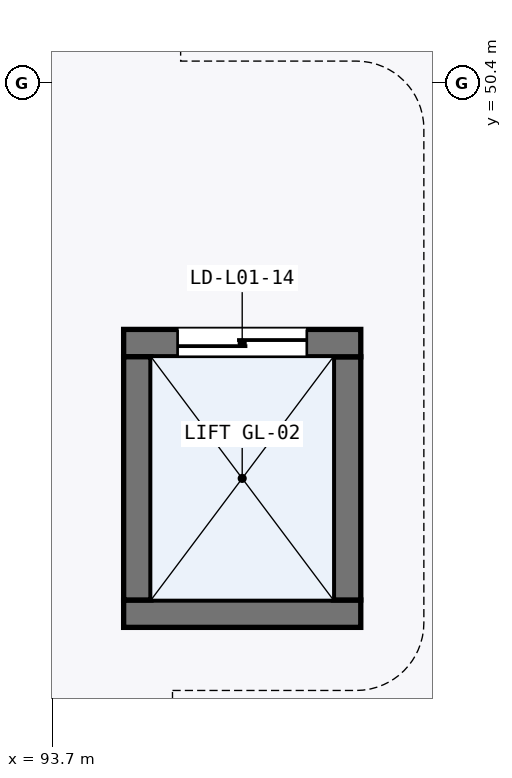
"""IFC4 building model, lengths in metres.
Left out: names, types, materials, properties, quantities, classifications, styles, units other than length and angle.
Written with IfcOpenShell. Run it as: python <this file> out.ifc"""

import sys

from ifc_helpers import new_model, si_unit, direction, frame, frame_2d, origin, place, context, subcontext, project, spatial, rectangle, extrude, element, fill, save


model = new_model("IFC4")
c1 = context("Model", 3, precision=1e-05, world=origin(), true_north=direction((0.0, 1.0)))
c2 = subcontext(c1, "Body", "Model", "MODEL_VIEW")
j1 = project(units=[si_unit("LENGTHUNIT", "METRE"), si_unit("PLANEANGLEUNIT", "RADIAN")], contexts=[c1])
p1 = place(None, origin())
s1 = spatial("IfcSite", under=j1, at=p1, CompositionType="ELEMENT")
p2 = place(p1, origin())
s2 = spatial("IfcBuilding", under=s1, at=p2, CompositionType="ELEMENT")
p3 = place(p2, origin())
s3 = spatial("IfcBuildingStorey", under=s2, at=p3, CompositionType="ELEMENT", Elevation=0.0)
p4 = place(p3, frame((94.64, 43.42, 0.0), z_axis=(0.0, 0.0, 1.0), x_axis=(1.0, 0.0, 0.0)))
e1 = element("IfcWall", 1, at=p4, inside=s3, PredefinedType="SHEAR", context=c2, shape_type="SweptSolid", body=[
    extrude(rectangle(XDim=3.12, YDim=0.36, at=frame_2d((1.56, 0.0))), origin(), (0.0, 0.0, 1.0), 5.745),
])
p5 = place(p3, frame((97.58, 43.6, 0.0), z_axis=(0.0, 0.0, 1.0), x_axis=(0.0, 1.0, 0.0)))
e2 = element("IfcWall", 2, at=p5, inside=s3, PredefinedType="SHEAR", context=c2, shape_type="SweptSolid", body=[
    extrude(rectangle(XDim=3.2, YDim=0.36, at=frame_2d((1.6, 0.0))), origin(), (0.0, 0.0, 1.0), 5.745),
])
p6 = place(p3, frame((97.76, 46.98, 0.0), z_axis=(0.0, 0.0, 1.0), x_axis=(-1.0, 0.0, 0.0)))
e3 = element("IfcWall", 3, at=p6, inside=s3, PredefinedType="SHEAR", context=c2, shape_type="SweptSolid", body=[
    extrude(rectangle(XDim=3.12, YDim=0.36, at=frame_2d((1.56, 0.0))), origin(), (0.0, 0.0, 1.0), 5.745),
])
p7 = place(p6, frame((0.71, 0.0, 0.0)))
e4 = element("IfcOpeningElement", 4, at=p7, cuts=e3, PredefinedType="OPENING", context=c2, shape_type="SweptSolid", body=[
    extrude(rectangle(XDim=1.7, YDim=2.3, at=frame_2d((0.85, 1.15))), frame((0.0, 0.19, 0.0), z_axis=(0.0, -1.0, 0.0), x_axis=(1.0, 0.0, 0.0)), (0.0, 0.0, 1.0), 0.38),
])
p8 = place(p3, frame((94.82, 46.8, 0.0), z_axis=(0.0, 0.0, 1.0), x_axis=(0.0, -1.0, 0.0)))
e5 = element("IfcWall", 5, at=p8, inside=s3, PredefinedType="SHEAR", context=c2, shape_type="SweptSolid", body=[
    extrude(rectangle(XDim=3.2, YDim=0.36, at=frame_2d((1.6, 0.0))), origin(), (0.0, 0.0, 1.0), 5.745),
])
p9 = place(p7, frame((1.7, 0.0, 0.0), z_axis=(0.0, 0.0, 1.0), x_axis=(-1.0, 0.0, 0.0)))
e6 = element("IfcDoor", 6, at=p9, inside=s3, OperationType="DOUBLE_DOOR_SLIDING", PredefinedType="DOOR", context=c2, shape_type="SweptSolid", body=[
    extrude(rectangle(XDim=1.7, YDim=2.3, at=frame_2d((0.85, 1.15))), frame((0.0, 0.025, 0.0), z_axis=(0.0, -1.0, 0.0), x_axis=(1.0, 0.0, 0.0)), (0.0, 0.0, 1.0), 0.05),
])
fill(e4, e6)
save(model, sys.argv[1])
